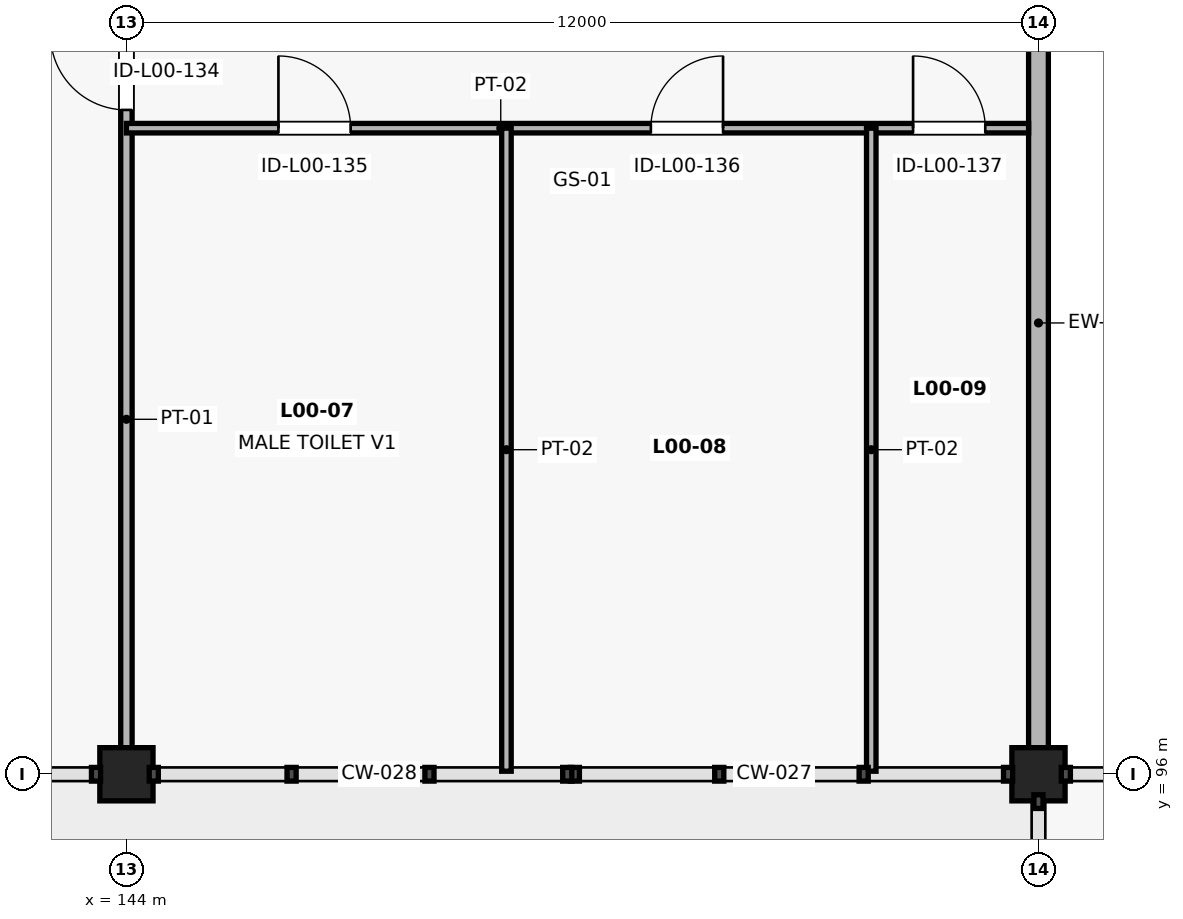
"""IFC4 building model, lengths in metres.
Left out: names, types, materials, properties, quantities, classifications, styles, units other than length and angle.
Written with IfcOpenShell. Run it as: python <this file> out.ifc"""

import sys

from ifc_helpers import new_model, si_unit, direction, frame, frame_2d, origin, origin_2d, place, context, subcontext, project, spatial, rectangle, extrude, element, fill, save


model = new_model("IFC4")
c1 = context("Model", 3, precision=1e-05, world=origin(), true_north=direction((0.0, 1.0)))
c2 = subcontext(c1, "Body", "Model", "MODEL_VIEW")
j1 = project(units=[si_unit("LENGTHUNIT", "METRE"), si_unit("PLANEANGLEUNIT", "RADIAN")], contexts=[c1])
p1 = place(None, origin())
s1 = spatial("IfcSite", under=j1, at=p1, CompositionType="ELEMENT")
p2 = place(p1, origin())
s2 = spatial("IfcBuilding", under=s1, at=p2, CompositionType="ELEMENT")
p3 = place(p2, origin())
s3 = spatial("IfcBuildingStorey", under=s2, at=p3, CompositionType="ELEMENT", Elevation=0.0)
for number, where, z_axis, x_axis in (
    (1, (144.0, 96.0, 0.0), (0.0, 0.0, 1.0), (1.0, 0.0, 0.0)),
    (2, (156.0, 96.0, 0.0), (0.0, 0.0, 1.0), (1.0, 0.0, 0.0)),
):
    element("IfcColumn", number, at=place(p3, frame(where, z_axis=z_axis, x_axis=x_axis)), inside=s3, PredefinedType="COLUMN", context=c2, shape_type="SweptSolid", body=[
        extrude(rectangle(XDim=0.7, YDim=0.7, at=origin_2d()), origin(), (0.0, 0.0, 1.0), 6.6),
    ])
p4 = place(p3, frame((156.0, 111.73, 0.0), z_axis=(0.0, 0.0, 1.0), x_axis=(0.0, -1.0, 0.0)))
e3 = element("IfcWall", 3, at=p4, inside=s3, PredefinedType="SOLIDWALL", context=c2, shape_type="SweptSolid", body=[
    extrude(rectangle(XDim=15.38, YDim=0.26, at=frame_2d((7.69, 0.0))), origin(), (0.0, 0.0, 1.0), 5.248),
])
p5 = place(p3, frame((144.0, 96.04, 0.0), z_axis=(0.0, 0.0, 1.0), x_axis=(0.0, 1.0, 0.0)))
e4 = element("IfcWall", 4, at=p5, inside=s3, PredefinedType="PARTITIONING", context=c2, shape_type="SweptSolid", body=[
    extrude(rectangle(XDim=11.48, YDim=0.15, at=frame_2d((5.74, 0.0))), origin(), (0.0, 0.0, 1.0), 5.243),
])
p6 = place(p5, frame((8.7, 0.0, 0.0)))
e5 = element("IfcOpeningElement", 5, at=p6, cuts=e4, PredefinedType="OPENING", context=c2, shape_type="SweptSolid", body=[
    extrude(rectangle(XDim=1.0, YDim=2.2, at=frame_2d((0.5, 1.1))), frame((0.0, 0.09, 0.0), z_axis=(0.0, -1.0, 0.0), x_axis=(1.0, 0.0, 0.0)), (0.0, 0.0, 1.0), 0.18),
])
p7 = place(p3, frame((144.0, 104.5, 0.0), z_axis=(0.0, 0.0, 1.0), x_axis=(1.0, 0.0, 0.0)))
e6 = element("IfcWall", 6, at=p7, inside=s3, PredefinedType="PARTITIONING", context=c2, shape_type="SweptSolid", body=[
    extrude(rectangle(XDim=11.87, YDim=0.125, at=frame_2d((5.935, 0.0))), origin(), (0.0, 0.0, 1.0), 5.393),
])
p8 = place(p7, frame((2.0, 0.0, 0.0)))
e7 = element("IfcOpeningElement", 7, at=p8, cuts=e6, PredefinedType="OPENING", context=c2, shape_type="SweptSolid", body=[
    extrude(rectangle(XDim=0.95, YDim=2.1, at=frame_2d((0.475, 1.05))), frame((0.0, 0.077, 0.0), z_axis=(0.0, -1.0, 0.0), x_axis=(1.0, 0.0, 0.0)), (0.0, 0.0, 1.0), 0.155),
])
p9 = place(p7, frame((6.9, 0.0, 0.0)))
e8 = element("IfcOpeningElement", 8, at=p9, cuts=e6, PredefinedType="OPENING", context=c2, shape_type="SweptSolid", body=[
    extrude(rectangle(XDim=0.95, YDim=2.1, at=frame_2d((0.475, 1.05))), frame((0.0, 0.077, 0.0), z_axis=(0.0, -1.0, 0.0), x_axis=(1.0, 0.0, 0.0)), (0.0, 0.0, 1.0), 0.155),
])
p10 = place(p7, frame((10.35, 0.0, 0.0)))
e9 = element("IfcOpeningElement", 9, at=p10, cuts=e6, PredefinedType="OPENING", context=c2, shape_type="SweptSolid", body=[
    extrude(rectangle(XDim=0.95, YDim=2.1, at=frame_2d((0.475, 1.05))), frame((0.0, 0.077, 0.0), z_axis=(0.0, -1.0, 0.0), x_axis=(1.0, 0.0, 0.0)), (0.0, 0.0, 1.0), 0.155),
])
for number, where, z_axis, x_axis in (
    (10, (149.0, 96.04, 0.0), (0.0, 0.0, 1.0), (0.0, 1.0, 0.0)),
    (11, (153.8, 96.04, 0.0), (0.0, 0.0, 1.0), (0.0, 1.0, 0.0)),
):
    element("IfcWall", number, at=place(p3, frame(where, z_axis=z_axis, x_axis=x_axis)), inside=s3, PredefinedType="PARTITIONING", context=c2, shape_type="SweptSolid", body=[
        extrude(rectangle(XDim=8.46, YDim=0.125, at=frame_2d((4.23, 0.0))), origin(), (0.0, 0.0, 1.0), 5.313),
    ])
p11 = place(p6, origin())
e12 = element("IfcDoor", 12, at=p11, inside=s3, OperationType="SINGLE_SWING_RIGHT", PredefinedType="DOOR", context=c2, shape_type="SweptSolid", body=[
    extrude(rectangle(XDim=1.0, YDim=2.2, at=frame_2d((0.5, 1.1))), frame((0.0, 0.025, 0.0), z_axis=(0.0, -1.0, 0.0), x_axis=(1.0, 0.0, 0.0)), (0.0, 0.0, 1.0), 0.05),
])
fill(e5, e12)
p12 = place(p8, origin())
e13 = element("IfcDoor", 13, at=p12, inside=s3, OperationType="SINGLE_SWING_LEFT", PredefinedType="DOOR", context=c2, shape_type="SweptSolid", body=[
    extrude(rectangle(XDim=0.95, YDim=2.1, at=frame_2d((0.475, 1.05))), frame((0.0, 0.025, 0.0), z_axis=(0.0, -1.0, 0.0), x_axis=(1.0, 0.0, 0.0)), (0.0, 0.0, 1.0), 0.05),
])
fill(e7, e13)
p13 = place(p9, origin())
e14 = element("IfcDoor", 14, at=p13, inside=s3, OperationType="SINGLE_SWING_RIGHT", PredefinedType="DOOR", context=c2, shape_type="SweptSolid", body=[
    extrude(rectangle(XDim=0.95, YDim=2.1, at=frame_2d((0.475, 1.05))), frame((0.0, 0.025, 0.0), z_axis=(0.0, -1.0, 0.0), x_axis=(1.0, 0.0, 0.0)), (0.0, 0.0, 1.0), 0.05),
])
fill(e8, e14)
p14 = place(p10, origin())
e15 = element("IfcDoor", 15, at=p14, inside=s3, OperationType="SINGLE_SWING_LEFT", PredefinedType="DOOR", context=c2, shape_type="SweptSolid", body=[
    extrude(rectangle(XDim=0.95, YDim=2.1, at=frame_2d((0.475, 1.05))), frame((0.0, 0.025, 0.0), z_axis=(0.0, -1.0, 0.0), x_axis=(1.0, 0.0, 0.0)), (0.0, 0.0, 1.0), 0.05),
])
fill(e9, e15)
save(model, sys.argv[1])
